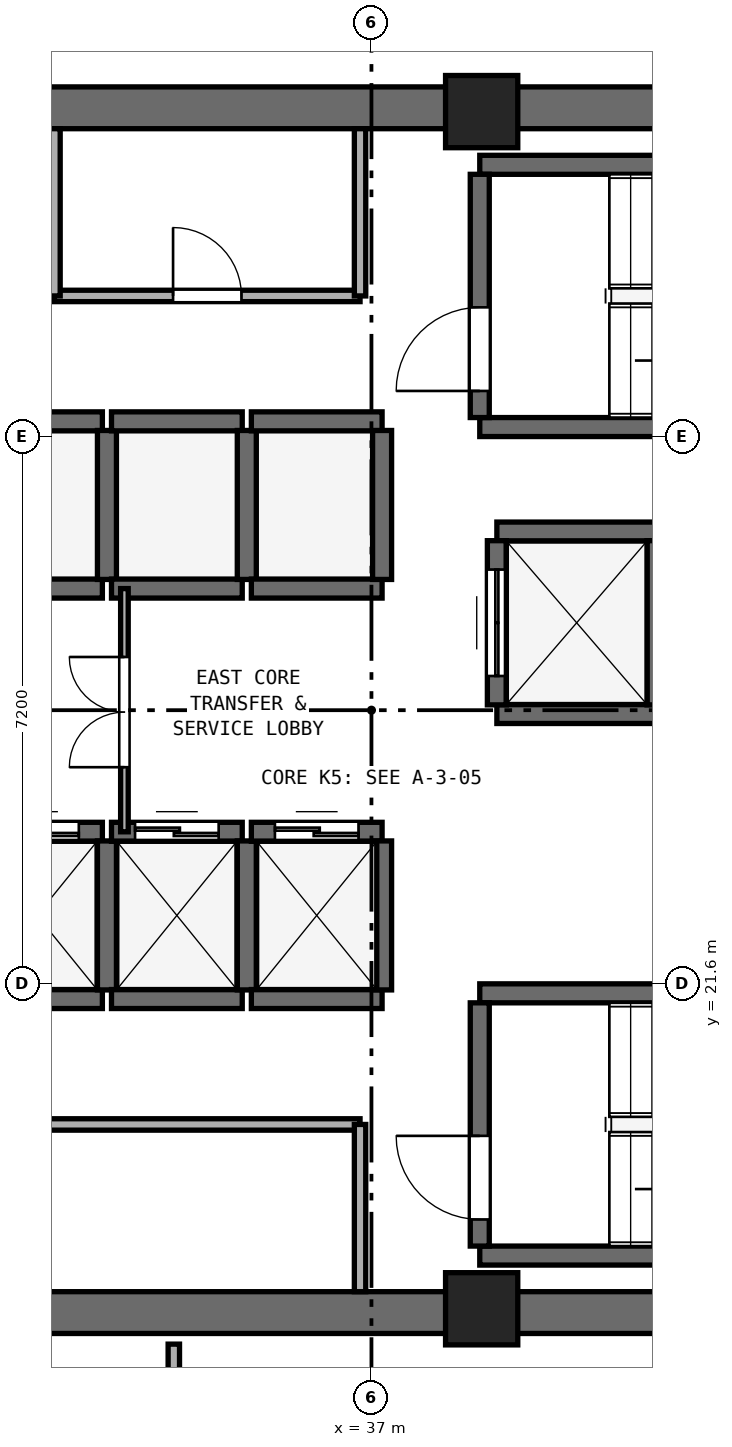
"""IFC4 building model, lengths in metres.
Left out: names, types, materials, properties, quantities, classifications, styles, units other than length and angle.
Written with IfcOpenShell. Run it as: python <this file> out.ifc"""

import sys

from ifc_helpers import new_model, si_unit, direction, frame, frame_2d, origin, origin_2d, place, context, subcontext, project, spatial, rectangle, extrude, element, fill, save


model = new_model("IFC4")
c1 = context("Model", 3, precision=1e-05, world=origin(), true_north=direction((0.0, 1.0)))
c2 = subcontext(c1, "Body", "Model", "MODEL_VIEW")
j1 = project(units=[si_unit("LENGTHUNIT", "METRE"), si_unit("PLANEANGLEUNIT", "RADIAN")], contexts=[c1])
p1 = place(None, origin())
s1 = spatial("IfcSite", under=j1, at=p1, CompositionType="ELEMENT")
p2 = place(p1, origin())
s2 = spatial("IfcBuilding", under=s1, at=p2, CompositionType="ELEMENT")
p3 = place(p2, frame((0.0, 0.0, 140.2)))
s3 = spatial("IfcBuildingStorey", under=s2, at=p3, CompositionType="ELEMENT", Elevation=140.2)
for number, where, z_axis, x_axis in (
    (1, (25.4, 17.275, 0.0), (0.0, 0.0, 1.0), (1.0, 0.0, 0.0)),
    (2, (25.4, 33.125, 0.0), (0.0, 0.0, 1.0), (1.0, 0.0, 0.0)),
):
    element("IfcWall", number, at=place(p3, frame(where, z_axis=z_axis, x_axis=x_axis)), inside=s3, PredefinedType="SHEAR", context=c2, shape_type="SweptSolid", body=[
        extrude(rectangle(XDim=23.2, YDim=0.55, at=frame_2d((11.6, 0.0))), origin(), (0.0, 0.0, 1.0), 3.54),
    ])
for number, where, z_axis, x_axis in (
    (3, (38.45, 17.325, 0.0), (0.0, 0.0, 1.0), (1.0, 0.0, 0.0)),
    (4, (38.45, 33.075, 0.0), (0.0, 0.0, 1.0), (1.0, 0.0, 0.0)),
):
    element("IfcColumn", number, at=place(p3, frame(where, z_axis=z_axis, x_axis=x_axis)), inside=s3, PredefinedType="PILASTER", context=c2, shape_type="SweptSolid", body=[
        extrude(rectangle(XDim=0.95, YDim=0.95, at=origin_2d()), origin(), (0.0, 0.0, 1.0), 3.8),
    ])
for number, where, z_axis, x_axis in (
    (5, (38.425, 28.925, 0.0), (0.0, 0.0, 1.0), (1.0, 0.0, 0.0)),
    (6, (38.425, 32.375, 0.0), (0.0, 0.0, 1.0), (1.0, 0.0, 0.0)),
):
    element("IfcWall", number, at=place(p3, frame(where, z_axis=z_axis, x_axis=x_axis)), inside=s3, PredefinedType="SHEAR", context=c2, shape_type="SweptSolid", body=[
        extrude(rectangle(XDim=7.3, YDim=0.25, at=frame_2d((3.65, 0.0))), origin(), (0.0, 0.0, 1.0), 3.54),
    ])
p4 = place(p3, frame((38.425, 29.05, 0.0), z_axis=(0.0, 0.0, 1.0), x_axis=(0.0, 1.0, 0.0)))
e7 = element("IfcWall", 7, at=p4, inside=s3, PredefinedType="SHEAR", context=c2, shape_type="SweptSolid", body=[
    extrude(rectangle(XDim=3.2, YDim=0.25, at=frame_2d((1.6, 0.0))), origin(), (0.0, 0.0, 1.0), 3.54),
])
p5 = place(p4, frame((0.35, 0.0, 0.0)))
e8 = element("IfcOpeningElement", 8, at=p5, cuts=e7, PredefinedType="OPENING", context=c2, shape_type="SweptSolid", body=[
    extrude(rectangle(XDim=1.1, YDim=2.15, at=frame_2d((0.55, 1.075))), frame((0.0, 0.135, 0.0), z_axis=(0.0, -1.0, 0.0), x_axis=(1.0, 0.0, 0.0)), (0.0, 0.0, 1.0), 0.27),
])
for number, where, z_axis, x_axis in (
    (9, (38.425, 18.025, 0.0), (0.0, 0.0, 1.0), (1.0, 0.0, 0.0)),
    (10, (38.425, 21.475, 0.0), (0.0, 0.0, 1.0), (1.0, 0.0, 0.0)),
):
    element("IfcWall", number, at=place(p3, frame(where, z_axis=z_axis, x_axis=x_axis)), inside=s3, PredefinedType="SHEAR", context=c2, shape_type="SweptSolid", body=[
        extrude(rectangle(XDim=7.3, YDim=0.25, at=frame_2d((3.65, 0.0))), origin(), (0.0, 0.0, 1.0), 3.54),
    ])
p6 = place(p3, frame((38.425, 18.15, 0.0), z_axis=(0.0, 0.0, 1.0), x_axis=(0.0, 1.0, 0.0)))
e11 = element("IfcWall", 11, at=p6, inside=s3, PredefinedType="SHEAR", context=c2, shape_type="SweptSolid", body=[
    extrude(rectangle(XDim=3.2, YDim=0.25, at=frame_2d((1.6, 0.0))), origin(), (0.0, 0.0, 1.0), 3.54),
])
p7 = place(p6, frame((0.35, 0.0, 0.0)))
e12 = element("IfcOpeningElement", 12, at=p7, cuts=e11, PredefinedType="OPENING", context=c2, shape_type="SweptSolid", body=[
    extrude(rectangle(XDim=1.1, YDim=2.15, at=frame_2d((0.55, 1.075))), frame((0.0, 0.135, 0.0), z_axis=(0.0, -1.0, 0.0), x_axis=(1.0, 0.0, 0.0)), (0.0, 0.0, 1.0), 0.27),
])
p8 = place(p3, frame((31.74, 21.4, 0.0), z_axis=(0.0, 0.0, 1.0), x_axis=(1.0, 0.0, 0.0)))
e13 = element("IfcWall", 13, at=p8, inside=s3, PredefinedType="SHEAR", context=c2, shape_type="SweptSolid", body=[
    extrude(rectangle(XDim=1.72, YDim=0.25, at=frame_2d((0.86, 0.0))), origin(), (0.0, 0.0, 1.0), 3.54),
])
p9 = place(p3, frame((31.74, 23.6, 0.0), z_axis=(0.0, 0.0, 1.0), x_axis=(1.0, 0.0, 0.0)))
e14 = element("IfcWall", 14, at=p9, inside=s3, PredefinedType="SHEAR", context=c2, shape_type="SweptSolid", body=[
    extrude(rectangle(XDim=1.72, YDim=0.25, at=frame_2d((0.86, 0.0))), origin(), (0.0, 0.0, 1.0), 3.54),
])
p10 = place(p9, frame((0.31, 0.0, 0.0)))
e15 = element("IfcOpeningElement", 15, at=p10, cuts=e14, PredefinedType="OPENING", context=c2, shape_type="SweptSolid", body=[
    extrude(rectangle(XDim=1.1, YDim=2.15, at=frame_2d((0.55, 1.075))), frame((0.0, 0.135, 0.0), z_axis=(0.0, -1.0, 0.0), x_axis=(1.0, 0.0, 0.0)), (0.0, 0.0, 1.0), 0.27),
])
p11 = place(p3, frame((33.52, 21.52, 0.0), z_axis=(0.0, 0.0, 1.0), x_axis=(0.0, 1.0, 0.0)))
e16 = element("IfcWall", 16, at=p11, inside=s3, PredefinedType="SHEAR", context=c2, shape_type="SweptSolid", body=[
    extrude(rectangle(XDim=1.96, YDim=0.25, at=frame_2d((0.98, 0.0))), origin(), (0.0, 0.0, 1.0), 3.54),
])
p12 = place(p3, frame((33.58, 21.4, 0.0), z_axis=(0.0, 0.0, 1.0), x_axis=(1.0, 0.0, 0.0)))
e17 = element("IfcWall", 17, at=p12, inside=s3, PredefinedType="SHEAR", context=c2, shape_type="SweptSolid", body=[
    extrude(rectangle(XDim=1.72, YDim=0.25, at=frame_2d((0.86, 0.0))), origin(), (0.0, 0.0, 1.0), 3.54),
])
p13 = place(p3, frame((33.58, 23.6, 0.0), z_axis=(0.0, 0.0, 1.0), x_axis=(1.0, 0.0, 0.0)))
e18 = element("IfcWall", 18, at=p13, inside=s3, PredefinedType="SHEAR", context=c2, shape_type="SweptSolid", body=[
    extrude(rectangle(XDim=1.72, YDim=0.25, at=frame_2d((0.86, 0.0))), origin(), (0.0, 0.0, 1.0), 3.54),
])
p14 = place(p13, frame((0.31, 0.0, 0.0)))
e19 = element("IfcOpeningElement", 19, at=p14, cuts=e18, PredefinedType="OPENING", context=c2, shape_type="SweptSolid", body=[
    extrude(rectangle(XDim=1.1, YDim=2.15, at=frame_2d((0.55, 1.075))), frame((0.0, 0.135, 0.0), z_axis=(0.0, -1.0, 0.0), x_axis=(1.0, 0.0, 0.0)), (0.0, 0.0, 1.0), 0.27),
])
p15 = place(p3, frame((35.36, 21.52, 0.0), z_axis=(0.0, 0.0, 1.0), x_axis=(0.0, 1.0, 0.0)))
e20 = element("IfcWall", 20, at=p15, inside=s3, PredefinedType="SHEAR", context=c2, shape_type="SweptSolid", body=[
    extrude(rectangle(XDim=1.96, YDim=0.25, at=frame_2d((0.98, 0.0))), origin(), (0.0, 0.0, 1.0), 3.54),
])
p16 = place(p3, frame((35.42, 21.4, 0.0), z_axis=(0.0, 0.0, 1.0), x_axis=(1.0, 0.0, 0.0)))
e21 = element("IfcWall", 21, at=p16, inside=s3, PredefinedType="SHEAR", context=c2, shape_type="SweptSolid", body=[
    extrude(rectangle(XDim=1.72, YDim=0.25, at=frame_2d((0.86, 0.0))), origin(), (0.0, 0.0, 1.0), 3.54),
])
p17 = place(p3, frame((35.42, 23.6, 0.0), z_axis=(0.0, 0.0, 1.0), x_axis=(1.0, 0.0, 0.0)))
e22 = element("IfcWall", 22, at=p17, inside=s3, PredefinedType="SHEAR", context=c2, shape_type="SweptSolid", body=[
    extrude(rectangle(XDim=1.72, YDim=0.25, at=frame_2d((0.86, 0.0))), origin(), (0.0, 0.0, 1.0), 3.54),
])
p18 = place(p17, frame((0.31, 0.0, 0.0)))
e23 = element("IfcOpeningElement", 23, at=p18, cuts=e22, PredefinedType="OPENING", context=c2, shape_type="SweptSolid", body=[
    extrude(rectangle(XDim=1.1, YDim=2.15, at=frame_2d((0.55, 1.075))), frame((0.0, 0.135, 0.0), z_axis=(0.0, -1.0, 0.0), x_axis=(1.0, 0.0, 0.0)), (0.0, 0.0, 1.0), 0.27),
])
p19 = place(p3, frame((37.14, 21.52, 0.0), z_axis=(0.0, 0.0, 1.0), x_axis=(0.0, 1.0, 0.0)))
e24 = element("IfcWall", 24, at=p19, inside=s3, PredefinedType="SHEAR", context=c2, shape_type="SweptSolid", body=[
    extrude(rectangle(XDim=1.96, YDim=0.25, at=frame_2d((0.98, 0.0))), origin(), (0.0, 0.0, 1.0), 3.54),
])
for number, where, z_axis, x_axis in (
    (25, (31.74, 26.8, 0.0), (0.0, 0.0, 1.0), (1.0, 0.0, 0.0)),
    (26, (31.74, 29.0, 0.0), (0.0, 0.0, 1.0), (1.0, 0.0, 0.0)),
):
    element("IfcWall", number, at=place(p3, frame(where, z_axis=z_axis, x_axis=x_axis)), inside=s3, PredefinedType="SHEAR", context=c2, shape_type="SweptSolid", body=[
        extrude(rectangle(XDim=1.72, YDim=0.25, at=frame_2d((0.86, 0.0))), origin(), (0.0, 0.0, 1.0), 3.54),
    ])
p20 = place(p3, frame((33.52, 26.92, 0.0), z_axis=(0.0, 0.0, 1.0), x_axis=(0.0, 1.0, 0.0)))
e27 = element("IfcWall", 27, at=p20, inside=s3, PredefinedType="SHEAR", context=c2, shape_type="SweptSolid", body=[
    extrude(rectangle(XDim=1.96, YDim=0.25, at=frame_2d((0.98, 0.0))), origin(), (0.0, 0.0, 1.0), 3.54),
])
for number, where, z_axis, x_axis in (
    (28, (33.58, 26.8, 0.0), (0.0, 0.0, 1.0), (1.0, 0.0, 0.0)),
    (29, (33.58, 29.0, 0.0), (0.0, 0.0, 1.0), (1.0, 0.0, 0.0)),
):
    element("IfcWall", number, at=place(p3, frame(where, z_axis=z_axis, x_axis=x_axis)), inside=s3, PredefinedType="SHEAR", context=c2, shape_type="SweptSolid", body=[
        extrude(rectangle(XDim=1.72, YDim=0.25, at=frame_2d((0.86, 0.0))), origin(), (0.0, 0.0, 1.0), 3.54),
    ])
p21 = place(p3, frame((35.36, 26.92, 0.0), z_axis=(0.0, 0.0, 1.0), x_axis=(0.0, 1.0, 0.0)))
e30 = element("IfcWall", 30, at=p21, inside=s3, PredefinedType="SHEAR", context=c2, shape_type="SweptSolid", body=[
    extrude(rectangle(XDim=1.96, YDim=0.25, at=frame_2d((0.98, 0.0))), origin(), (0.0, 0.0, 1.0), 3.54),
])
for number, where, z_axis, x_axis in (
    (31, (35.42, 26.8, 0.0), (0.0, 0.0, 1.0), (1.0, 0.0, 0.0)),
    (32, (35.42, 29.0, 0.0), (0.0, 0.0, 1.0), (1.0, 0.0, 0.0)),
):
    element("IfcWall", number, at=place(p3, frame(where, z_axis=z_axis, x_axis=x_axis)), inside=s3, PredefinedType="SHEAR", context=c2, shape_type="SweptSolid", body=[
        extrude(rectangle(XDim=1.72, YDim=0.25, at=frame_2d((0.86, 0.0))), origin(), (0.0, 0.0, 1.0), 3.54),
    ])
p22 = place(p3, frame((37.14, 26.92, 0.0), z_axis=(0.0, 0.0, 1.0), x_axis=(0.0, 1.0, 0.0)))
e33 = element("IfcWall", 33, at=p22, inside=s3, PredefinedType="SHEAR", context=c2, shape_type="SweptSolid", body=[
    extrude(rectangle(XDim=1.96, YDim=0.25, at=frame_2d((0.98, 0.0))), origin(), (0.0, 0.0, 1.0), 3.54),
])
for number, where, z_axis, x_axis in (
    (34, (38.65, 25.15, 0.0), (0.0, 0.0, 1.0), (1.0, 0.0, 0.0)),
    (35, (38.65, 27.55, 0.0), (0.0, 0.0, 1.0), (1.0, 0.0, 0.0)),
):
    element("IfcWall", number, at=place(p3, frame(where, z_axis=z_axis, x_axis=x_axis)), inside=s3, PredefinedType="SHEAR", context=c2, shape_type="SweptSolid", body=[
        extrude(rectangle(XDim=2.1, YDim=0.25, at=frame_2d((1.05, 0.0))), origin(), (0.0, 0.0, 1.0), 3.54),
    ])
p23 = place(p3, frame((38.65, 25.27, 0.0), z_axis=(0.0, 0.0, 1.0), x_axis=(0.0, 1.0, 0.0)))
e36 = element("IfcWall", 36, at=p23, inside=s3, PredefinedType="SHEAR", context=c2, shape_type="SweptSolid", body=[
    extrude(rectangle(XDim=2.16, YDim=0.25, at=frame_2d((1.08, 0.0))), origin(), (0.0, 0.0, 1.0), 3.54),
])
p24 = place(p23, frame((0.38, 0.0, 0.0)))
e37 = element("IfcOpeningElement", 37, at=p24, cuts=e36, PredefinedType="OPENING", context=c2, shape_type="SweptSolid", body=[
    extrude(rectangle(XDim=1.4, YDim=2.2, at=frame_2d((0.7, 1.1))), frame((0.0, 0.135, 0.0), z_axis=(0.0, -1.0, 0.0), x_axis=(1.0, 0.0, 0.0)), (0.0, 0.0, 1.0), 0.27),
])
p25 = place(p3, frame((40.75, 25.27, 0.0), z_axis=(0.0, 0.0, 1.0), x_axis=(0.0, 1.0, 0.0)))
e38 = element("IfcWall", 38, at=p25, inside=s3, PredefinedType="SHEAR", context=c2, shape_type="SweptSolid", body=[
    extrude(rectangle(XDim=2.16, YDim=0.25, at=frame_2d((1.08, 0.0))), origin(), (0.0, 0.0, 1.0), 3.54),
])
p26 = place(p3, frame((32.83, 30.65, 0.0), z_axis=(0.0, 0.0, 1.0), x_axis=(1.0, 0.0, 0.0)))
e39 = element("IfcWall", 39, at=p26, inside=s3, PredefinedType="PARTITIONING", context=c2, shape_type="SweptSolid", body=[
    extrude(rectangle(XDim=4.02, YDim=0.15, at=frame_2d((2.01, 0.0))), origin(), (0.0, 0.0, 1.0), 3.54),
])
p27 = place(p26, frame((1.56, 0.0, 0.0)))
e40 = element("IfcOpeningElement", 40, at=p27, cuts=e39, PredefinedType="OPENING", context=c2, shape_type="SweptSolid", body=[
    extrude(rectangle(XDim=0.9, YDim=2.1, at=frame_2d((0.45, 1.05))), frame((0.0, 0.085, 0.0), z_axis=(0.0, -1.0, 0.0), x_axis=(1.0, 0.0, 0.0)), (0.0, 0.0, 1.0), 0.17),
])
for number, where, z_axis, x_axis in (
    (41, (32.83, 30.65, 0.0), (0.0, 0.0, 1.0), (0.0, 1.0, 0.0)),
    (42, (36.85, 30.65, 0.0), (0.0, 0.0, 1.0), (0.0, 1.0, 0.0)),
):
    element("IfcWall", number, at=place(p3, frame(where, z_axis=z_axis, x_axis=x_axis)), inside=s3, PredefinedType="PARTITIONING", context=c2, shape_type="SweptSolid", body=[
        extrude(rectangle(XDim=2.2, YDim=0.15, at=frame_2d((1.1, 0.0))), origin(), (0.0, 0.0, 1.0), 3.54),
    ])
p28 = place(p3, frame((26.07, 19.75, 0.0), z_axis=(0.0, 0.0, 1.0), x_axis=(1.0, 0.0, 0.0)))
e43 = element("IfcWall", 43, at=p28, inside=s3, PredefinedType="PARTITIONING", context=c2, shape_type="SweptSolid", body=[
    extrude(rectangle(XDim=10.78, YDim=0.15, at=frame_2d((5.39, 0.0))), origin(), (0.0, 0.0, 1.0), 3.54),
])
p29 = place(p28, frame((4.915, 0.0, 0.0)))
e44 = element("IfcOpeningElement", 44, at=p29, cuts=e43, PredefinedType="OPENING", context=c2, shape_type="SweptSolid", body=[
    extrude(rectangle(XDim=0.95, YDim=2.1, at=frame_2d((0.475, 1.05))), frame((0.0, 0.085, 0.0), z_axis=(0.0, -1.0, 0.0), x_axis=(1.0, 0.0, 0.0)), (0.0, 0.0, 1.0), 0.17),
])
p30 = place(p3, frame((36.85, 17.55, 0.0), z_axis=(0.0, 0.0, 1.0), x_axis=(0.0, 1.0, 0.0)))
e45 = element("IfcWall", 45, at=p30, inside=s3, PredefinedType="PARTITIONING", context=c2, shape_type="SweptSolid", body=[
    extrude(rectangle(XDim=2.2, YDim=0.15, at=frame_2d((1.1, 0.0))), origin(), (0.0, 0.0, 1.0), 3.54),
])
p31 = place(p3, frame((33.75, 23.6, 0.0), z_axis=(0.0, 0.0, 1.0), x_axis=(0.0, 1.0, 0.0)))
e46 = element("IfcWall", 46, at=p31, inside=s3, PredefinedType="PARTITIONING", context=c2, shape_type="SweptSolid", body=[
    extrude(rectangle(XDim=3.2, YDim=0.1, at=frame_2d((1.6, 0.0))), origin(), (0.0, 0.0, 1.0), 3.54),
])
p32 = place(p31, frame((0.85, 0.0, 0.0)))
e47 = element("IfcOpeningElement", 47, at=p32, cuts=e46, PredefinedType="OPENING", context=c2, shape_type="SweptSolid", body=[
    extrude(rectangle(XDim=1.45, YDim=2.12, at=frame_2d((0.725, 1.06))), frame((0.0, 0.06, 0.0), z_axis=(0.0, -1.0, 0.0), x_axis=(1.0, 0.0, 0.0)), (0.0, 0.0, 1.0), 0.12),
])
p33 = place(p3, frame((34.4, 14.85, 0.0), z_axis=(0.0, 0.0, 1.0), x_axis=(0.0, 1.0, 0.0)))
e48 = element("IfcWall", 48, at=p33, inside=s3, PredefinedType="PARTITIONING", context=c2, shape_type="SweptSolid", body=[
    extrude(rectangle(XDim=2.01, YDim=0.15, at=frame_2d((1.005, 0.0))), origin(), (0.0, 0.0, 1.0), 3.54),
])
p34 = place(p5, origin())
e49 = element("IfcDoor", 49, at=p34, inside=s3, OperationType="SINGLE_SWING_LEFT", PredefinedType="DOOR", context=c2, shape_type="SweptSolid", body=[
    extrude(rectangle(XDim=1.1, YDim=2.15, at=frame_2d((0.55, 1.075))), frame((0.0, 0.025, 0.0), z_axis=(0.0, -1.0, 0.0), x_axis=(1.0, 0.0, 0.0)), (0.0, 0.0, 1.0), 0.05),
])
fill(e8, e49)
p35 = place(p7, origin())
e50 = element("IfcDoor", 50, at=p35, inside=s3, OperationType="SINGLE_SWING_RIGHT", PredefinedType="DOOR", context=c2, shape_type="SweptSolid", body=[
    extrude(rectangle(XDim=1.1, YDim=2.15, at=frame_2d((0.55, 1.075))), frame((0.0, 0.025, 0.0), z_axis=(0.0, -1.0, 0.0), x_axis=(1.0, 0.0, 0.0)), (0.0, 0.0, 1.0), 0.05),
])
fill(e12, e50)
p36 = place(p10, origin())
e51 = element("IfcDoor", 51, at=p36, inside=s3, OperationType="DOUBLE_DOOR_SLIDING", PredefinedType="DOOR", context=c2, shape_type="SweptSolid", body=[
    extrude(rectangle(XDim=1.1, YDim=2.15, at=frame_2d((0.55, 1.075))), frame((0.0, 0.025, 0.0), z_axis=(0.0, -1.0, 0.0), x_axis=(1.0, 0.0, 0.0)), (0.0, 0.0, 1.0), 0.05),
])
fill(e15, e51)
p37 = place(p14, origin())
e52 = element("IfcDoor", 52, at=p37, inside=s3, OperationType="DOUBLE_DOOR_SLIDING", PredefinedType="DOOR", context=c2, shape_type="SweptSolid", body=[
    extrude(rectangle(XDim=1.1, YDim=2.15, at=frame_2d((0.55, 1.075))), frame((0.0, 0.025, 0.0), z_axis=(0.0, -1.0, 0.0), x_axis=(1.0, 0.0, 0.0)), (0.0, 0.0, 1.0), 0.05),
])
fill(e19, e52)
p38 = place(p18, origin())
e53 = element("IfcDoor", 53, at=p38, inside=s3, OperationType="DOUBLE_DOOR_SLIDING", PredefinedType="DOOR", context=c2, shape_type="SweptSolid", body=[
    extrude(rectangle(XDim=1.1, YDim=2.15, at=frame_2d((0.55, 1.075))), frame((0.0, 0.025, 0.0), z_axis=(0.0, -1.0, 0.0), x_axis=(1.0, 0.0, 0.0)), (0.0, 0.0, 1.0), 0.05),
])
fill(e23, e53)
p39 = place(p24, origin())
e54 = element("IfcDoor", 54, at=p39, inside=s3, OperationType="DOUBLE_DOOR_SLIDING", PredefinedType="DOOR", context=c2, shape_type="SweptSolid", body=[
    extrude(rectangle(XDim=1.4, YDim=2.2, at=frame_2d((0.7, 1.1))), frame((0.0, 0.025, 0.0), z_axis=(0.0, -1.0, 0.0), x_axis=(1.0, 0.0, 0.0)), (0.0, 0.0, 1.0), 0.05),
])
fill(e37, e54)
p40 = place(p27, origin())
e55 = element("IfcDoor", 55, at=p40, inside=s3, OperationType="SINGLE_SWING_LEFT", PredefinedType="DOOR", context=c2, shape_type="SweptSolid", body=[
    extrude(rectangle(XDim=0.9, YDim=2.1, at=frame_2d((0.45, 1.05))), frame((0.0, 0.025, 0.0), z_axis=(0.0, -1.0, 0.0), x_axis=(1.0, 0.0, 0.0)), (0.0, 0.0, 1.0), 0.05),
])
fill(e40, e55)
p41 = place(p32, origin())
e56 = element("IfcDoor", 56, at=p41, inside=s3, OperationType="DOUBLE_DOOR_SINGLE_SWING", PredefinedType="DOOR", context=c2, shape_type="SweptSolid", body=[
    extrude(rectangle(XDim=1.45, YDim=2.12, at=frame_2d((0.725, 1.06))), frame((0.0, 0.025, 0.0), z_axis=(0.0, -1.0, 0.0), x_axis=(1.0, 0.0, 0.0)), (0.0, 0.0, 1.0), 0.05),
])
fill(e47, e56)
save(model, sys.argv[1])
